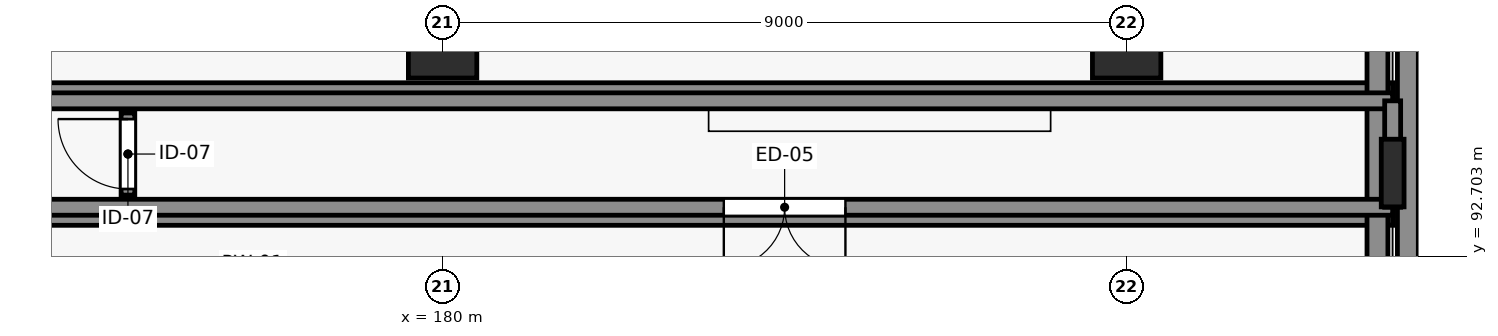
"""IFC4 building model, lengths in metres.
Left out: names, types, materials, properties, quantities, classifications, styles, units other than length and angle.
Written with IfcOpenShell. Run it as: python <this file> out.ifc"""

import sys

from ifc_helpers import new_model, si_unit, direction, frame, frame_2d, origin, origin_2d, place, context, subcontext, project, spatial, rectangle, i_section, extrude, element, fill, save


model = new_model("IFC4")
c1 = context("Model", 3, precision=1e-05, world=origin(), true_north=direction((0.0, 1.0)))
c2 = subcontext(c1, "Body", "Model", "MODEL_VIEW")
j1 = project(units=[si_unit("LENGTHUNIT", "METRE"), si_unit("PLANEANGLEUNIT", "RADIAN")], contexts=[c1])
p1 = place(None, origin())
s1 = spatial("IfcSite", under=j1, at=p1, CompositionType="ELEMENT")
p2 = place(p1, origin())
s2 = spatial("IfcBuilding", under=s1, at=p2, CompositionType="ELEMENT")
p3 = place(p2, origin())
s3 = spatial("IfcBuildingStorey", under=s2, at=p3, CompositionType="ELEMENT", Elevation=0.0)
for number, where, z_axis, x_axis in (
    (1, (141.5, 93.25, 0.0), (0.0, 0.0, 1.0), (1.0, 0.0, 0.0)),
    (2, (141.5, 94.85, 0.0), (0.0, 0.0, 1.0), (1.0, 0.0, 0.0)),
):
    element("IfcWall", number, at=place(p3, frame(where, z_axis=z_axis, x_axis=x_axis)), inside=s3, PredefinedType="SOLIDWALL", context=c2, shape_type="SweptSolid", body=[
        extrude(rectangle(XDim=51.0, YDim=0.275, at=frame_2d((25.5, 0.0))), origin(), (0.0, 0.0, 1.0), 0.675),
    ])
for number, where, z_axis, x_axis in (
    (3, (192.3, 92.25, 0.0), (0.0, 0.0, 1.0), (0.0, 1.0, 0.0)),
    (4, (192.7, 92.25, 0.0), (0.0, 0.0, 1.0), (0.0, 1.0, 0.0)),
):
    element("IfcWall", number, at=place(p3, frame(where, z_axis=z_axis, x_axis=x_axis)), inside=s3, PredefinedType="SOLIDWALL", context=c2, shape_type="SweptSolid", body=[
        extrude(rectangle(XDim=3.6, YDim=0.275, at=frame_2d((1.8, 0.0))), origin(), (0.0, 0.0, 1.0), 0.675),
    ])
for number, where, z_axis, x_axis in (
    (5, (180.0, 95.5, 0.0), (0.0, 0.0, 1.0), (1.0, 0.0, 0.0)),
    (6, (189.0, 95.5, 0.0), (0.0, 0.0, 1.0), (1.0, 0.0, 0.0)),
):
    element("IfcColumn", number, at=place(p3, frame(where, z_axis=z_axis, x_axis=x_axis)), inside=s3, PredefinedType="COLUMN", context=c2, shape_type="SweptSolid", body=[
        extrude(rectangle(XDim=0.9, YDim=0.9, at=origin_2d()), origin(), (0.0, 0.0, 1.0), 4.8),
    ])
p4 = place(p3, frame((192.5, 93.8, 0.2), z_axis=(0.0, 0.0, 1.0), x_axis=(1.0, 0.0, 0.0)))
e7 = element("IfcColumn", 7, at=p4, inside=s3, PredefinedType="COLUMN", context=c2, shape_type="SweptSolid", body=[
    extrude(i_section(OverallWidth=0.3, OverallDepth=0.89, WebThickness=0.016, FlangeThickness=0.03, FilletRadius=0.03, at=origin_2d()), origin(), (0.0, 0.0, 1.0), 4.25),
])
p5 = place(p3, frame((192.5, 93.35, 0.915), z_axis=(0.0, 0.0, 1.0), x_axis=(-1.0, 0.0, 0.0)))
e8 = element("IfcWall", 8, at=p5, inside=s3, PredefinedType="SOLIDWALL", context=c2, shape_type="SweptSolid", body=[
    extrude(rectangle(XDim=51.0, YDim=0.21, at=frame_2d((25.5, 0.0))), origin(), (0.0, 0.0, 1.0), 3.185),
])
p6 = place(p5, frame((25.2, 0.0, 0.0)))
e9 = element("IfcOpeningElement", 9, at=p6, cuts=e8, PredefinedType="OPENING", context=c2, shape_type="SweptSolid", body=[
    extrude(rectangle(XDim=1.6, YDim=2.3, at=frame_2d((0.8, 1.15))), frame((0.0, 0.115, 0.0), z_axis=(0.0, -1.0, 0.0), x_axis=(1.0, 0.0, 0.0)), (0.0, 0.0, 1.0), 0.23),
])
p7 = place(p5, frame((7.2, 0.0, 0.0)))
e10 = element("IfcOpeningElement", 10, at=p7, cuts=e8, PredefinedType="OPENING", context=c2, shape_type="SweptSolid", body=[
    extrude(rectangle(XDim=1.6, YDim=2.3, at=frame_2d((0.8, 1.15))), frame((0.0, 0.115, 0.0), z_axis=(0.0, -1.0, 0.0), x_axis=(1.0, 0.0, 0.0)), (0.0, 0.0, 1.0), 0.23),
])
p8 = place(p5, frame((36.0, 0.0, 0.9)))
e11 = element("IfcOpeningElement", 11, at=p8, cuts=e8, PredefinedType="OPENING", context=c2, shape_type="SweptSolid", body=[
    extrude(rectangle(XDim=4.2, YDim=1.5, at=frame_2d((2.1, 0.75))), frame((0.0, 0.115, 0.0), z_axis=(0.0, -1.0, 0.0), x_axis=(1.0, 0.0, 0.0)), (0.0, 0.0, 1.0), 0.23),
])
p9 = place(p3, frame((141.5, 94.75, 0.915), z_axis=(0.0, 0.0, 1.0), x_axis=(1.0, 0.0, 0.0)))
e12 = element("IfcWall", 12, at=p9, inside=s3, PredefinedType="SOLIDWALL", context=c2, shape_type="SweptSolid", body=[
    extrude(rectangle(XDim=51.0, YDim=0.21, at=frame_2d((25.5, 0.0))), origin(), (0.0, 0.0, 1.0), 3.185),
])
p10 = place(p9, frame((15.2, 0.0, 0.0)))
e13 = element("IfcOpeningElement", 13, at=p10, cuts=e12, PredefinedType="OPENING", context=c2, shape_type="SweptSolid", body=[
    extrude(rectangle(XDim=1.6, YDim=2.3, at=frame_2d((0.8, 1.15))), frame((0.0, 0.115, 0.0), z_axis=(0.0, -1.0, 0.0), x_axis=(1.0, 0.0, 0.0)), (0.0, 0.0, 1.0), 0.23),
])
p11 = place(p9, frame((24.0, 0.0, 0.9)))
e14 = element("IfcOpeningElement", 14, at=p11, cuts=e12, PredefinedType="OPENING", context=c2, shape_type="SweptSolid", body=[
    extrude(rectangle(XDim=4.2, YDim=1.5, at=frame_2d((2.1, 0.75))), frame((0.0, 0.115, 0.0), z_axis=(0.0, -1.0, 0.0), x_axis=(1.0, 0.0, 0.0)), (0.0, 0.0, 1.0), 0.23),
])
p12 = place(p3, frame((192.5, 94.75, 0.915), z_axis=(0.0, 0.0, 1.0), x_axis=(0.0, -1.0, 0.0)))
e15 = element("IfcWall", 15, at=p12, inside=s3, PredefinedType="SOLIDWALL", context=c2, shape_type="SweptSolid", body=[
    extrude(rectangle(XDim=1.4, YDim=0.21, at=frame_2d((0.7, 0.0))), origin(), (0.0, 0.0, 1.0), 3.185),
])
p13 = place(p3, frame((175.86, 93.51, 0.915), z_axis=(0.0, 0.0, 1.0), x_axis=(0.0, 1.0, 0.0)))
e16 = element("IfcWall", 16, at=p13, inside=s3, PredefinedType="PARTITIONING", context=c2, shape_type="SweptSolid", body=[
    extrude(rectangle(XDim=1.08, YDim=0.18, at=frame_2d((0.54, 0.0))), origin(), (0.0, 0.0, 1.0), 3.435),
])
p14 = place(p13, frame((0.08, 0.0, 0.0)))
e17 = element("IfcOpeningElement", 17, at=p14, cuts=e16, PredefinedType="OPENING", context=c2, shape_type="SweptSolid", body=[
    extrude(rectangle(XDim=0.92, YDim=2.1, at=frame_2d((0.46, 1.05))), frame((0.0, 0.1, 0.0), z_axis=(0.0, -1.0, 0.0), x_axis=(1.0, 0.0, 0.0)), (0.0, 0.0, 1.0), 0.2),
])
p15 = place(p7, origin())
e18 = element("IfcDoor", 18, at=p15, inside=s3, OperationType="DOUBLE_DOOR_SINGLE_SWING", PredefinedType="DOOR", context=c2, shape_type="SweptSolid", body=[
    extrude(rectangle(XDim=1.6, YDim=2.3, at=frame_2d((0.8, 1.15))), frame((0.0, 0.025, 0.0), z_axis=(0.0, -1.0, 0.0), x_axis=(1.0, 0.0, 0.0)), (0.0, 0.0, 1.0), 0.05),
])
fill(e10, e18)
p16 = place(p14, origin())
e19 = element("IfcDoor", 19, at=p16, inside=s3, OperationType="SINGLE_SWING_RIGHT", PredefinedType="DOOR", context=c2, shape_type="SweptSolid", body=[
    extrude(rectangle(XDim=0.92, YDim=2.1, at=frame_2d((0.46, 1.05))), frame((0.0, 0.025, 0.0), z_axis=(0.0, -1.0, 0.0), x_axis=(1.0, 0.0, 0.0)), (0.0, 0.0, 1.0), 0.05),
])
fill(e17, e19)
save(model, sys.argv[1])
